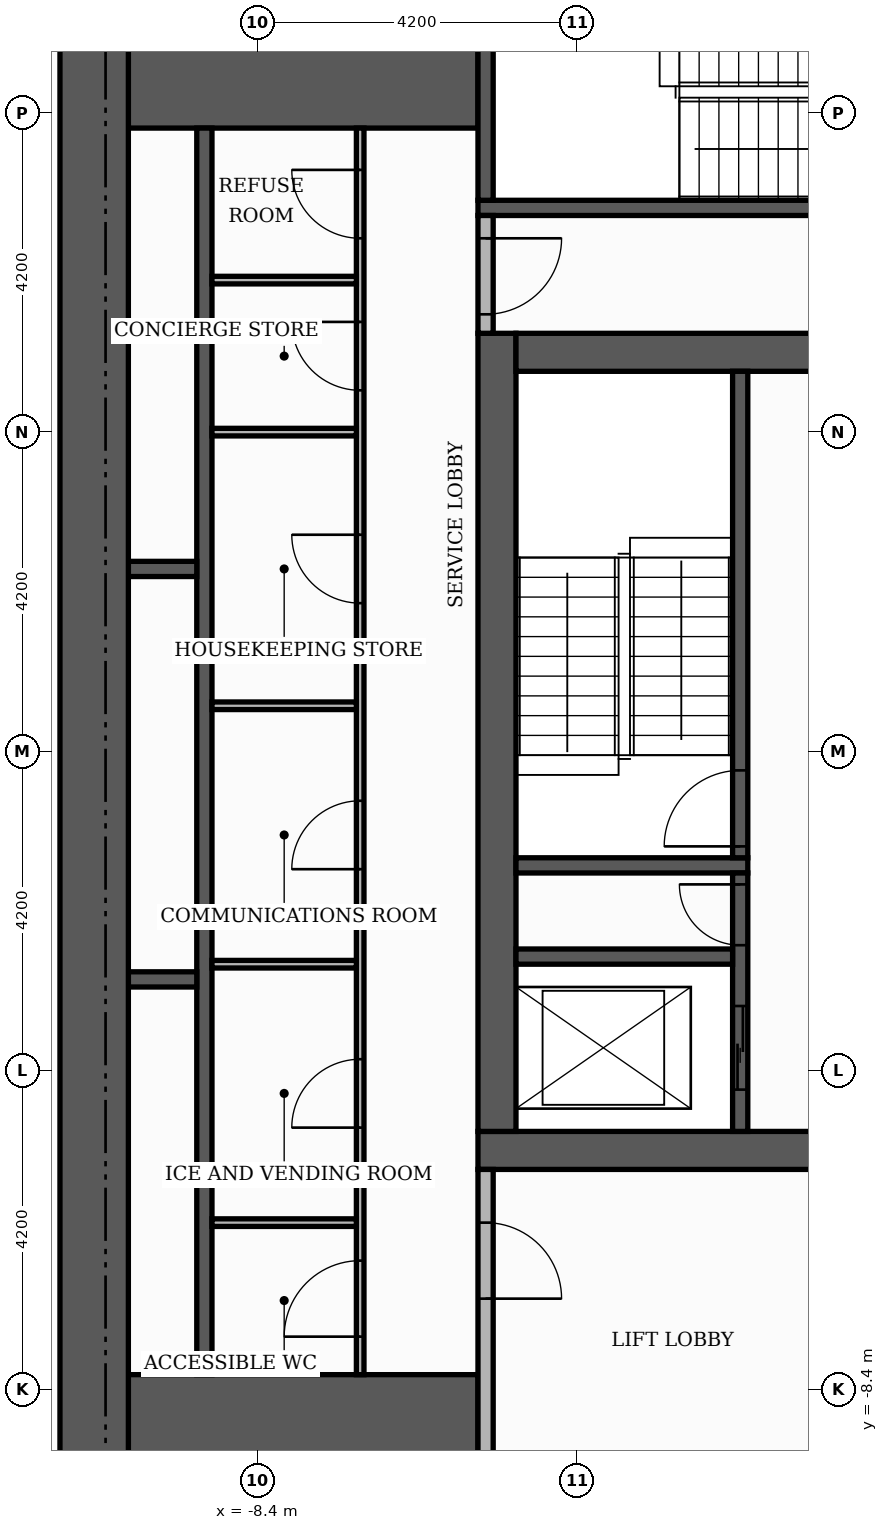
"""IFC4 building model, lengths in metres.
Left out: names, types, materials, properties, quantities, classifications, styles, units other than length and angle.
Written with IfcOpenShell. Run it as: python <this file> out.ifc"""

import sys

from ifc_helpers import new_model, si_unit, direction, frame, frame_2d, origin, place, context, subcontext, project, spatial, rectangle, extrude, element, fill, save


model = new_model("IFC4")
c1 = context("Model", 3, precision=1e-05, world=origin(), true_north=direction((0.0, 1.0)))
c2 = subcontext(c1, "Body", "Model", "MODEL_VIEW")
j1 = project(units=[si_unit("LENGTHUNIT", "METRE"), si_unit("PLANEANGLEUNIT", "RADIAN")], contexts=[c1])
p1 = place(None, origin())
s1 = spatial("IfcSite", under=j1, at=p1, CompositionType="ELEMENT")
p2 = place(p1, origin())
s2 = spatial("IfcBuilding", under=s1, at=p2, CompositionType="ELEMENT")
p3 = place(p2, frame((0.0, 0.0, 227.4)))
s3 = spatial("IfcBuildingStorey", under=s2, at=p3, CompositionType="ELEMENT", Elevation=227.4)
p4 = place(p3, frame((-5.5, -5.25, 0.0), z_axis=(0.0, 0.0, 1.0), x_axis=(1.0, 0.0, 0.0)))
e1 = element("IfcWall", 1, at=p4, inside=s3, PredefinedType="SHEAR", context=c2, shape_type="SweptSolid", body=[
    extrude(rectangle(XDim=11.0, YDim=0.5, at=frame_2d((5.5, 0.0))), origin(), (0.0, 0.0, 1.0), 3.48),
])
p5 = place(p4, frame((4.9, 0.0, 0.0)))
e2 = element("IfcOpeningElement", 2, at=p5, cuts=e1, PredefinedType="OPENING", context=c2, shape_type="SweptSolid", body=[
    extrude(rectangle(XDim=1.2, YDim=2.1, at=frame_2d((0.6, 1.05))), frame((0.0, 0.26, 0.0), z_axis=(0.0, -1.0, 0.0), x_axis=(1.0, 0.0, 0.0)), (0.0, 0.0, 1.0), 0.52),
])
p6 = place(p3, frame((-5.25, -5.0, 0.0), z_axis=(0.0, 0.0, 1.0), x_axis=(0.0, 1.0, 0.0)))
e3 = element("IfcWall", 3, at=p6, inside=s3, PredefinedType="SHEAR", context=c2, shape_type="SweptSolid", body=[
    extrude(rectangle(XDim=10.5, YDim=0.5, at=frame_2d((5.25, 0.0))), origin(), (0.0, 0.0, 1.0), 3.48),
])
p7 = place(p3, frame((-5.0, 5.25, 0.0), z_axis=(0.0, 0.0, 1.0), x_axis=(1.0, 0.0, 0.0)))
e4 = element("IfcWall", 4, at=p7, inside=s3, PredefinedType="SHEAR", context=c2, shape_type="SweptSolid", body=[
    extrude(rectangle(XDim=10.0, YDim=0.5, at=frame_2d((5.0, 0.0))), origin(), (0.0, 0.0, 1.0), 3.48),
])
p8 = place(p7, frame((4.4, 0.0, 0.0)))
e5 = element("IfcOpeningElement", 5, at=p8, cuts=e4, PredefinedType="OPENING", context=c2, shape_type="SweptSolid", body=[
    extrude(rectangle(XDim=1.2, YDim=2.1, at=frame_2d((0.6, 1.05))), frame((0.0, 0.26, 0.0), z_axis=(0.0, -1.0, 0.0), x_axis=(1.0, 0.0, 0.0)), (0.0, 0.0, 1.0), 0.52),
])
for number, where, z_axis, x_axis in (
    (6, (-10.1, -9.15, 0.0), (0.0, 0.0, 1.0), (1.0, 0.0, 0.0)),
    (7, (-10.1, 9.15, 0.0), (0.0, 0.0, 1.0), (1.0, 0.0, 0.0)),
):
    element("IfcWall", number, at=place(p3, frame(where, z_axis=z_axis, x_axis=x_axis)), inside=s3, PredefinedType="SHEAR", context=c2, shape_type="SweptSolid", body=[
        extrude(rectangle(XDim=4.6, YDim=1.9, at=frame_2d((2.3, 0.0))), origin(), (0.0, 0.0, 1.0), 3.48),
    ])
p9 = place(p3, frame((-5.0, -1.5, 0.0), z_axis=(0.0, 0.0, 1.0), x_axis=(1.0, 0.0, 0.0)))
e8 = element("IfcWall", 8, at=p9, inside=s3, PredefinedType="SHEAR", context=c2, shape_type="SweptSolid", body=[
    extrude(rectangle(XDim=3.05, YDim=0.2, at=frame_2d((1.525, 0.0))), origin(), (0.0, 0.0, 1.0), 3.48),
])
p10 = place(p3, frame((-2.05, -1.4, 0.0), z_axis=(0.0, 0.0, 1.0), x_axis=(0.0, 1.0, 0.0)))
e9 = element("IfcWall", 9, at=p10, inside=s3, PredefinedType="SHEAR", context=c2, shape_type="SweptSolid", body=[
    extrude(rectangle(XDim=6.4, YDim=0.2, at=frame_2d((3.2, 0.0))), origin(), (0.0, 0.0, 1.0), 3.48),
])
p11 = place(p10, frame((0.15, 0.0, 0.0)))
e10 = element("IfcOpeningElement", 10, at=p11, cuts=e9, PredefinedType="OPENING", context=c2, shape_type="SweptSolid", body=[
    extrude(rectangle(XDim=1.0, YDim=2.1, at=frame_2d((0.5, 1.05))), frame((0.0, 0.11, 0.0), z_axis=(0.0, -1.0, 0.0), x_axis=(1.0, 0.0, 0.0)), (0.0, 0.0, 1.0), 0.22),
])
p12 = place(p3, frame((-5.5, 7.15, 0.0), z_axis=(0.0, 0.0, 1.0), x_axis=(1.0, 0.0, 0.0)))
e11 = element("IfcWall", 11, at=p12, inside=s3, PredefinedType="SHEAR", context=c2, shape_type="SweptSolid", body=[
    extrude(rectangle(XDim=6.8, YDim=0.2, at=frame_2d((3.4, 0.0))), origin(), (0.0, 0.0, 1.0), 3.48),
])
p13 = place(p3, frame((-5.4, 7.25, 0.0), z_axis=(0.0, 0.0, 1.0), x_axis=(0.0, 1.0, 0.0)))
e12 = element("IfcWall", 12, at=p13, inside=s3, PredefinedType="SHEAR", context=c2, shape_type="SweptSolid", body=[
    extrude(rectangle(XDim=2.85, YDim=0.2, at=frame_2d((1.425, 0.0))), origin(), (0.0, 0.0, 1.0), 3.48),
])
p14 = place(p3, frame((-9.1, -8.2, 0.0), z_axis=(0.0, 0.0, 1.0), x_axis=(0.0, 1.0, 0.0)))
e13 = element("IfcWall", 13, at=p14, inside=s3, PredefinedType="SHEAR", context=c2, shape_type="SweptSolid", body=[
    extrude(rectangle(XDim=16.4, YDim=0.2, at=frame_2d((8.2, 0.0))), origin(), (0.0, 0.0, 1.0), 3.48),
])
p15 = place(p3, frame((-2.05, -5.0, 0.0), z_axis=(0.0, 0.0, 1.0), x_axis=(0.0, 1.0, 0.0)))
e14 = element("IfcWall", 14, at=p15, inside=s3, PredefinedType="SHEAR", context=c2, shape_type="SweptSolid", body=[
    extrude(rectangle(XDim=3.4, YDim=0.2, at=frame_2d((1.7, 0.0))), origin(), (0.0, 0.0, 1.0), 3.48),
])
p16 = place(p15, frame((0.55, 0.0, 0.0)))
e15 = element("IfcOpeningElement", 15, at=p16, cuts=e14, PredefinedType="OPENING", context=c2, shape_type="SweptSolid", body=[
    extrude(rectangle(XDim=1.1, YDim=2.1, at=frame_2d((0.55, 1.05))), frame((0.0, 0.11, 0.0), z_axis=(0.0, -1.0, 0.0), x_axis=(1.0, 0.0, 0.0)), (0.0, 0.0, 1.0), 0.22),
])
p17 = place(p15, frame((2.45, 0.0, 0.0)))
e16 = element("IfcOpeningElement", 16, at=p17, cuts=e14, PredefinedType="OPENING", context=c2, shape_type="SweptSolid", body=[
    extrude(rectangle(XDim=0.8, YDim=2.1, at=frame_2d((0.4, 1.05))), frame((0.0, 0.11, 0.0), z_axis=(0.0, -1.0, 0.0), x_axis=(1.0, 0.0, 0.0)), (0.0, 0.0, 1.0), 0.22),
])
p18 = place(p3, frame((-10.1, -3.0, 0.0), z_axis=(0.0, 0.0, 1.0), x_axis=(1.0, 0.0, 0.0)))
e17 = element("IfcWall", 17, at=p18, inside=s3, PredefinedType="SHEAR", context=c2, shape_type="SweptSolid", body=[
    extrude(rectangle(XDim=0.9, YDim=0.2, at=frame_2d((0.45, 0.0))), origin(), (0.0, 0.0, 1.0), 3.48),
])
p19 = place(p3, frame((-5.0, -2.7, 0.0), z_axis=(0.0, 0.0, 1.0), x_axis=(1.0, 0.0, 0.0)))
e18 = element("IfcWall", 18, at=p19, inside=s3, PredefinedType="SHEAR", context=c2, shape_type="SweptSolid", body=[
    extrude(rectangle(XDim=2.85, YDim=0.2, at=frame_2d((1.425, 0.0))), origin(), (0.0, 0.0, 1.0), 3.48),
])
p20 = place(p3, frame((-10.1, 2.4, 0.0), z_axis=(0.0, 0.0, 1.0), x_axis=(1.0, 0.0, 0.0)))
e19 = element("IfcWall", 19, at=p20, inside=s3, PredefinedType="SHEAR", context=c2, shape_type="SweptSolid", body=[
    extrude(rectangle(XDim=0.9, YDim=0.2, at=frame_2d((0.45, 0.0))), origin(), (0.0, 0.0, 1.0), 3.48),
])
p21 = place(p3, frame((-10.55, -10.1, 0.0), z_axis=(0.0, 0.0, 1.0), x_axis=(0.0, 1.0, 0.0)))
e20 = element("IfcWall", 20, at=p21, inside=s3, PredefinedType="SHEAR", context=c2, shape_type="SweptSolid", body=[
    extrude(rectangle(XDim=20.2, YDim=0.9, at=frame_2d((10.1, 0.0))), origin(), (0.0, 0.0, 1.0), 3.48),
])
p22 = place(p3, frame((-5.4, -10.1, 0.0), z_axis=(0.0, 0.0, 1.0), x_axis=(0.0, 1.0, 0.0)))
e21 = element("IfcWall", 21, at=p22, inside=s3, PredefinedType="PARTITIONING", context=c2, shape_type="SweptSolid", body=[
    extrude(rectangle(XDim=4.6, YDim=0.2, at=frame_2d((2.3, 0.0))), origin(), (0.0, 0.0, 1.0), 3.48),
])
p23 = place(p22, frame((2.9, 0.0, 0.0)))
e22 = element("IfcOpeningElement", 22, at=p23, cuts=e21, PredefinedType="OPENING", context=c2, shape_type="SweptSolid", body=[
    extrude(rectangle(XDim=1.0, YDim=2.1, at=frame_2d((0.5, 1.05))), frame((0.0, 0.11, 0.0), z_axis=(0.0, -1.0, 0.0), x_axis=(1.0, 0.0, 0.0)), (0.0, 0.0, 1.0), 0.22),
])
p24 = place(p3, frame((-7.05, -8.2, 0.0), z_axis=(0.0, 0.0, 1.0), x_axis=(0.0, 1.0, 0.0)))
e23 = element("IfcWall", 23, at=p24, inside=s3, PredefinedType="PARTITIONING", context=c2, shape_type="SweptSolid", body=[
    extrude(rectangle(XDim=16.4, YDim=0.1, at=frame_2d((8.2, 0.0))), origin(), (0.0, 0.0, 1.0), 3.48),
])
p25 = place(p24, frame((0.5, 0.0, 0.0)))
e24 = element("IfcOpeningElement", 24, at=p25, cuts=e23, PredefinedType="OPENING", context=c2, shape_type="SweptSolid", body=[
    extrude(rectangle(XDim=1.0, YDim=2.1, at=frame_2d((0.5, 1.05))), frame((0.0, 0.06, 0.0), z_axis=(0.0, -1.0, 0.0), x_axis=(1.0, 0.0, 0.0)), (0.0, 0.0, 1.0), 0.12),
])
p26 = place(p24, frame((3.25, 0.0, 0.0)))
e25 = element("IfcOpeningElement", 25, at=p26, cuts=e23, PredefinedType="OPENING", context=c2, shape_type="SweptSolid", body=[
    extrude(rectangle(XDim=0.9, YDim=2.1, at=frame_2d((0.45, 1.05))), frame((0.0, 0.06, 0.0), z_axis=(0.0, -1.0, 0.0), x_axis=(1.0, 0.0, 0.0)), (0.0, 0.0, 1.0), 0.12),
])
p27 = place(p24, frame((6.65, 0.0, 0.0)))
e26 = element("IfcOpeningElement", 26, at=p27, cuts=e23, PredefinedType="OPENING", context=c2, shape_type="SweptSolid", body=[
    extrude(rectangle(XDim=0.9, YDim=2.1, at=frame_2d((0.45, 1.05))), frame((0.0, 0.06, 0.0), z_axis=(0.0, -1.0, 0.0), x_axis=(1.0, 0.0, 0.0)), (0.0, 0.0, 1.0), 0.12),
])
p28 = place(p24, frame((10.15, 0.0, 0.0)))
e27 = element("IfcOpeningElement", 27, at=p28, cuts=e23, PredefinedType="OPENING", context=c2, shape_type="SweptSolid", body=[
    extrude(rectangle(XDim=0.9, YDim=2.1, at=frame_2d((0.45, 1.05))), frame((0.0, 0.06, 0.0), z_axis=(0.0, -1.0, 0.0), x_axis=(1.0, 0.0, 0.0)), (0.0, 0.0, 1.0), 0.12),
])
p29 = place(p24, frame((12.95, 0.0, 0.0)))
e28 = element("IfcOpeningElement", 28, at=p29, cuts=e23, PredefinedType="OPENING", context=c2, shape_type="SweptSolid", body=[
    extrude(rectangle(XDim=0.9, YDim=2.1, at=frame_2d((0.45, 1.05))), frame((0.0, 0.06, 0.0), z_axis=(0.0, -1.0, 0.0), x_axis=(1.0, 0.0, 0.0)), (0.0, 0.0, 1.0), 0.12),
])
p30 = place(p24, frame((14.95, 0.0, 0.0)))
e29 = element("IfcOpeningElement", 29, at=p30, cuts=e23, PredefinedType="OPENING", context=c2, shape_type="SweptSolid", body=[
    extrude(rectangle(XDim=0.9, YDim=2.1, at=frame_2d((0.45, 1.05))), frame((0.0, 0.06, 0.0), z_axis=(0.0, -1.0, 0.0), x_axis=(1.0, 0.0, 0.0)), (0.0, 0.0, 1.0), 0.12),
])
for number, where, z_axis, x_axis in (
    (30, (-9.0, -6.2, 0.0), (0.0, 0.0, 1.0), (1.0, 0.0, 0.0)),
    (31, (-9.0, -2.8, 0.0), (0.0, 0.0, 1.0), (1.0, 0.0, 0.0)),
    (32, (-9.0, 0.6, 0.0), (0.0, 0.0, 1.0), (1.0, 0.0, 0.0)),
    (33, (-9.0, 4.2, 0.0), (0.0, 0.0, 1.0), (1.0, 0.0, 0.0)),
):
    element("IfcWall", number, at=place(p3, frame(where, z_axis=z_axis, x_axis=x_axis)), inside=s3, PredefinedType="PARTITIONING", context=c2, shape_type="SweptSolid", body=[
        extrude(rectangle(XDim=1.9, YDim=0.1, at=frame_2d((0.95, 0.0))), origin(), (0.0, 0.0, 1.0), 3.48),
    ])
p31 = place(p3, frame((-5.4, 5.5, 0.0), z_axis=(0.0, 0.0, 1.0), x_axis=(0.0, 1.0, 0.0)))
e34 = element("IfcWall", 34, at=p31, inside=s3, PredefinedType="PARTITIONING", context=c2, shape_type="SweptSolid", body=[
    extrude(rectangle(XDim=1.55, YDim=0.2, at=frame_2d((0.775, 0.0))), origin(), (0.0, 0.0, 1.0), 3.48),
])
p32 = place(p31, frame((0.25, 0.0, 0.0)))
e35 = element("IfcOpeningElement", 35, at=p32, cuts=e34, PredefinedType="OPENING", context=c2, shape_type="SweptSolid", body=[
    extrude(rectangle(XDim=1.0, YDim=2.1, at=frame_2d((0.5, 1.05))), frame((0.0, 0.11, 0.0), z_axis=(0.0, -1.0, 0.0), x_axis=(1.0, 0.0, 0.0)), (0.0, 0.0, 1.0), 0.22),
])
p33 = place(p3, frame((-9.0, 6.2, 0.0), z_axis=(0.0, 0.0, 1.0), x_axis=(1.0, 0.0, 0.0)))
e36 = element("IfcWall", 36, at=p33, inside=s3, PredefinedType="PARTITIONING", context=c2, shape_type="SweptSolid", body=[
    extrude(rectangle(XDim=1.9, YDim=0.1, at=frame_2d((0.95, 0.0))), origin(), (0.0, 0.0, 1.0), 3.48),
])
p34 = place(p16, origin())
e37 = element("IfcDoor", 37, at=p34, inside=s3, OperationType="SLIDING_TO_LEFT", PredefinedType="DOOR", context=c2, shape_type="SweptSolid", body=[
    extrude(rectangle(XDim=1.1, YDim=2.1, at=frame_2d((0.55, 1.05))), frame((0.0, 0.025, 0.0), z_axis=(0.0, -1.0, 0.0), x_axis=(1.0, 0.0, 0.0)), (0.0, 0.0, 1.0), 0.05),
])
fill(e15, e37)
p35 = place(p11, origin())
e38 = element("IfcDoor", 38, at=p35, inside=s3, OperationType="SINGLE_SWING_LEFT", PredefinedType="DOOR", context=c2, shape_type="SweptSolid", body=[
    extrude(rectangle(XDim=1.0, YDim=2.1, at=frame_2d((0.5, 1.05))), frame((0.0, 0.025, 0.0), z_axis=(0.0, -1.0, 0.0), x_axis=(1.0, 0.0, 0.0)), (0.0, 0.0, 1.0), 0.05),
])
fill(e10, e38)
p36 = place(p17, origin())
e39 = element("IfcDoor", 39, at=p36, inside=s3, OperationType="SINGLE_SWING_RIGHT", PredefinedType="DOOR", context=c2, shape_type="SweptSolid", body=[
    extrude(rectangle(XDim=0.8, YDim=2.1, at=frame_2d((0.4, 1.05))), frame((0.0, 0.025, 0.0), z_axis=(0.0, -1.0, 0.0), x_axis=(1.0, 0.0, 0.0)), (0.0, 0.0, 1.0), 0.05),
])
fill(e16, e39)
p37 = place(p32, frame((1.0, 0.0, 0.0), z_axis=(0.0, 0.0, 1.0), x_axis=(-1.0, 0.0, 0.0)))
e40 = element("IfcDoor", 40, at=p37, inside=s3, OperationType="SINGLE_SWING_RIGHT", PredefinedType="DOOR", context=c2, shape_type="SweptSolid", body=[
    extrude(rectangle(XDim=1.0, YDim=2.1, at=frame_2d((0.5, 1.05))), frame((0.0, 0.025, 0.0), z_axis=(0.0, -1.0, 0.0), x_axis=(1.0, 0.0, 0.0)), (0.0, 0.0, 1.0), 0.05),
])
fill(e35, e40)
p38 = place(p23, frame((1.0, 0.0, 0.0), z_axis=(0.0, 0.0, 1.0), x_axis=(-1.0, 0.0, 0.0)))
e41 = element("IfcDoor", 41, at=p38, inside=s3, OperationType="SINGLE_SWING_LEFT", PredefinedType="DOOR", context=c2, shape_type="SweptSolid", body=[
    extrude(rectangle(XDim=1.0, YDim=2.1, at=frame_2d((0.5, 1.05))), frame((0.0, 0.025, 0.0), z_axis=(0.0, -1.0, 0.0), x_axis=(1.0, 0.0, 0.0)), (0.0, 0.0, 1.0), 0.05),
])
fill(e22, e41)
p39 = place(p25, origin())
e42 = element("IfcDoor", 42, at=p39, inside=s3, OperationType="SINGLE_SWING_LEFT", PredefinedType="DOOR", context=c2, shape_type="SweptSolid", body=[
    extrude(rectangle(XDim=1.0, YDim=2.1, at=frame_2d((0.5, 1.05))), frame((0.0, 0.025, 0.0), z_axis=(0.0, -1.0, 0.0), x_axis=(1.0, 0.0, 0.0)), (0.0, 0.0, 1.0), 0.05),
])
fill(e24, e42)
p40 = place(p26, origin())
e43 = element("IfcDoor", 43, at=p40, inside=s3, OperationType="SINGLE_SWING_LEFT", PredefinedType="DOOR", context=c2, shape_type="SweptSolid", body=[
    extrude(rectangle(XDim=0.9, YDim=2.1, at=frame_2d((0.45, 1.05))), frame((0.0, 0.025, 0.0), z_axis=(0.0, -1.0, 0.0), x_axis=(1.0, 0.0, 0.0)), (0.0, 0.0, 1.0), 0.05),
])
fill(e25, e43)
p41 = place(p27, origin())
e44 = element("IfcDoor", 44, at=p41, inside=s3, OperationType="SINGLE_SWING_LEFT", PredefinedType="DOOR", context=c2, shape_type="SweptSolid", body=[
    extrude(rectangle(XDim=0.9, YDim=2.1, at=frame_2d((0.45, 1.05))), frame((0.0, 0.025, 0.0), z_axis=(0.0, -1.0, 0.0), x_axis=(1.0, 0.0, 0.0)), (0.0, 0.0, 1.0), 0.05),
])
fill(e26, e44)
p42 = place(p28, origin())
e45 = element("IfcDoor", 45, at=p42, inside=s3, OperationType="SINGLE_SWING_RIGHT", PredefinedType="DOOR", context=c2, shape_type="SweptSolid", body=[
    extrude(rectangle(XDim=0.9, YDim=2.1, at=frame_2d((0.45, 1.05))), frame((0.0, 0.025, 0.0), z_axis=(0.0, -1.0, 0.0), x_axis=(1.0, 0.0, 0.0)), (0.0, 0.0, 1.0), 0.05),
])
fill(e27, e45)
p43 = place(p29, origin())
e46 = element("IfcDoor", 46, at=p43, inside=s3, OperationType="SINGLE_SWING_RIGHT", PredefinedType="DOOR", context=c2, shape_type="SweptSolid", body=[
    extrude(rectangle(XDim=0.9, YDim=2.1, at=frame_2d((0.45, 1.05))), frame((0.0, 0.025, 0.0), z_axis=(0.0, -1.0, 0.0), x_axis=(1.0, 0.0, 0.0)), (0.0, 0.0, 1.0), 0.05),
])
fill(e28, e46)
p44 = place(p30, origin())
e47 = element("IfcDoor", 47, at=p44, inside=s3, OperationType="SINGLE_SWING_RIGHT", PredefinedType="DOOR", context=c2, shape_type="SweptSolid", body=[
    extrude(rectangle(XDim=0.9, YDim=2.1, at=frame_2d((0.45, 1.05))), frame((0.0, 0.025, 0.0), z_axis=(0.0, -1.0, 0.0), x_axis=(1.0, 0.0, 0.0)), (0.0, 0.0, 1.0), 0.05),
])
fill(e29, e47)
save(model, sys.argv[1])
